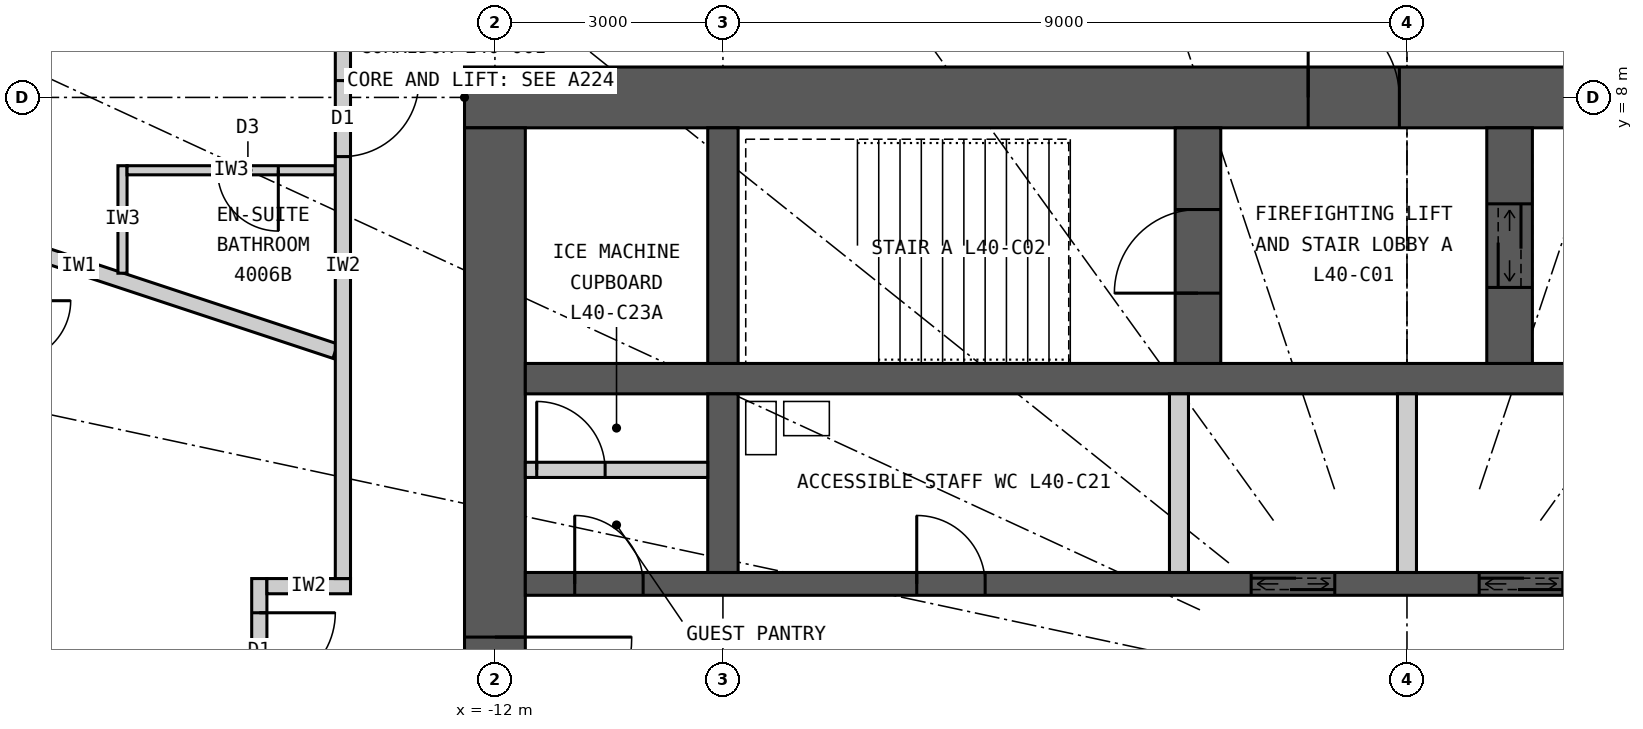
"""IFC4 building model, lengths in metres.
Left out: names, types, materials, properties, quantities, classifications, styles, units other than length and angle.
Written with IfcOpenShell. Run it as: python <this file> out.ifc"""

import sys

from ifc_helpers import new_model, si_unit, direction, frame, frame_2d, origin, place, context, subcontext, project, spatial, rectangle, extrude, element, fill, save


model = new_model("IFC4")
c1 = context("Model", 3, precision=1e-05, world=origin(), true_north=direction((0.0, 1.0)))
c2 = subcontext(c1, "Body", "Model", "MODEL_VIEW")
j1 = project(units=[si_unit("LENGTHUNIT", "METRE"), si_unit("PLANEANGLEUNIT", "RADIAN")], contexts=[c1])
p1 = place(None, origin())
s1 = spatial("IfcSite", under=j1, at=p1, CompositionType="ELEMENT")
p2 = place(p1, origin())
s2 = spatial("IfcBuilding", under=s1, at=p2, CompositionType="ELEMENT")
p3 = place(p2, frame((0.0, 0.0, 153.3)))
s3 = spatial("IfcBuildingStorey", under=s2, at=p3, CompositionType="ELEMENT", Elevation=153.3)
p4 = place(p3, frame((-12.4, 8.0, 0.0), z_axis=(0.0, 0.0, 1.0), x_axis=(1.0, 0.0, 0.0)))
e1 = element("IfcWall", 1, at=p4, inside=s3, PredefinedType="SHEAR", context=c2, shape_type="SweptSolid", body=[
    extrude(rectangle(XDim=24.8, YDim=0.8, at=frame_2d((12.4, 0.0))), origin(), (0.0, 0.0, 1.0), 3.3),
])
p5 = place(p4, frame((11.1, 0.0, 0.0)))
e2 = element("IfcOpeningElement", 2, at=p5, cuts=e1, PredefinedType="OPENING", context=c2, shape_type="SweptSolid", body=[
    extrude(rectangle(XDim=1.2, YDim=2.2, at=frame_2d((0.6, 1.1))), frame((0.0, 0.41, 0.0), z_axis=(0.0, -1.0, 0.0), x_axis=(1.0, 0.0, 0.0)), (0.0, 0.0, 1.0), 0.82),
])
p6 = place(p4, frame((18.7, 0.0, 0.0)))
e3 = element("IfcOpeningElement", 3, at=p6, cuts=e1, PredefinedType="OPENING", context=c2, shape_type="SweptSolid", body=[
    extrude(rectangle(XDim=0.9, YDim=2.2, at=frame_2d((0.45, 1.1))), frame((0.0, 0.41, 0.0), z_axis=(0.0, -1.0, 0.0), x_axis=(1.0, 0.0, 0.0)), (0.0, 0.0, 1.0), 0.82),
])
p7 = place(p3, frame((-12.0, 7.6, 0.0), z_axis=(0.0, 0.0, 1.0), x_axis=(0.0, -1.0, 0.0)))
e4 = element("IfcWall", 4, at=p7, inside=s3, PredefinedType="SHEAR", context=c2, shape_type="SweptSolid", body=[
    extrude(rectangle(XDim=15.2, YDim=0.8, at=frame_2d((7.6, 0.0))), origin(), (0.0, 0.0, 1.0), 3.3),
])
p8 = place(p7, frame((6.7, 0.0, 0.0)))
e5 = element("IfcOpeningElement", 5, at=p8, cuts=e4, PredefinedType="OPENING", context=c2, shape_type="SweptSolid", body=[
    extrude(rectangle(XDim=1.8, YDim=2.2, at=frame_2d((0.9, 1.1))), frame((0.0, 0.41, 0.0), z_axis=(0.0, -1.0, 0.0), x_axis=(1.0, 0.0, 0.0)), (0.0, 0.0, 1.0), 0.82),
])
p9 = place(p3, frame((-11.6, 4.3, 0.0), z_axis=(0.0, 0.0, 1.0), x_axis=(1.0, 0.0, 0.0)))
e6 = element("IfcWall", 6, at=p9, inside=s3, PredefinedType="SHEAR", context=c2, shape_type="SweptSolid", body=[
    extrude(rectangle(XDim=23.2, YDim=0.4, at=frame_2d((11.6, 0.0))), origin(), (0.0, 0.0, 1.0), 3.3),
])
p10 = place(p3, frame((-11.6, 1.6, 0.0), z_axis=(0.0, 0.0, 1.0), x_axis=(1.0, 0.0, 0.0)))
e7 = element("IfcWall", 7, at=p10, inside=s3, PredefinedType="SHEAR", context=c2, shape_type="SweptSolid", body=[
    extrude(rectangle(XDim=23.2, YDim=0.3, at=frame_2d((11.6, 0.0))), origin(), (0.0, 0.0, 1.0), 3.3),
])
p11 = place(p10, frame((9.55, 0.0, 0.0)))
e8 = element("IfcOpeningElement", 8, at=p11, cuts=e7, PredefinedType="OPENING", context=c2, shape_type="SweptSolid", body=[
    extrude(rectangle(XDim=1.1, YDim=2.2, at=frame_2d((0.55, 1.1))), frame((0.0, 0.16, 0.0), z_axis=(0.0, -1.0, 0.0), x_axis=(1.0, 0.0, 0.0)), (0.0, 0.0, 1.0), 0.32),
])
p12 = place(p10, frame((12.55, 0.0, 0.0)))
e9 = element("IfcOpeningElement", 9, at=p12, cuts=e7, PredefinedType="OPENING", context=c2, shape_type="SweptSolid", body=[
    extrude(rectangle(XDim=1.1, YDim=2.2, at=frame_2d((0.55, 1.1))), frame((0.0, 0.16, 0.0), z_axis=(0.0, -1.0, 0.0), x_axis=(1.0, 0.0, 0.0)), (0.0, 0.0, 1.0), 0.32),
])
p13 = place(p10, frame((5.15, 0.0, 0.0)))
e10 = element("IfcOpeningElement", 10, at=p13, cuts=e7, PredefinedType="OPENING", context=c2, shape_type="SweptSolid", body=[
    extrude(rectangle(XDim=0.9, YDim=2.2, at=frame_2d((0.45, 1.1))), frame((0.0, 0.16, 0.0), z_axis=(0.0, -1.0, 0.0), x_axis=(1.0, 0.0, 0.0)), (0.0, 0.0, 1.0), 0.32),
])
p14 = place(p10, frame((21.65, 0.0, 0.0)))
e11 = element("IfcOpeningElement", 11, at=p14, cuts=e7, PredefinedType="OPENING", context=c2, shape_type="SweptSolid", body=[
    extrude(rectangle(XDim=0.9, YDim=2.2, at=frame_2d((0.45, 1.1))), frame((0.0, 0.16, 0.0), z_axis=(0.0, -1.0, 0.0), x_axis=(1.0, 0.0, 0.0)), (0.0, 0.0, 1.0), 0.32),
])
p15 = place(p10, frame((0.65, 0.0, 0.0)))
e12 = element("IfcOpeningElement", 12, at=p15, cuts=e7, PredefinedType="OPENING", context=c2, shape_type="SweptSolid", body=[
    extrude(rectangle(XDim=0.9, YDim=2.2, at=frame_2d((0.45, 1.1))), frame((0.0, 0.16, 0.0), z_axis=(0.0, -1.0, 0.0), x_axis=(1.0, 0.0, 0.0)), (0.0, 0.0, 1.0), 0.32),
])
p16 = place(p3, frame((-9.0, 4.5, 0.0), z_axis=(0.0, 0.0, 1.0), x_axis=(0.0, 1.0, 0.0)))
e13 = element("IfcWall", 13, at=p16, inside=s3, PredefinedType="SHEAR", context=c2, shape_type="SweptSolid", body=[
    extrude(rectangle(XDim=3.1, YDim=0.4, at=frame_2d((1.55, 0.0))), origin(), (0.0, 0.0, 1.0), 3.3),
])
p17 = place(p3, frame((-9.0, 1.75, 0.0), z_axis=(0.0, 0.0, 1.0), x_axis=(0.0, 1.0, 0.0)))
e14 = element("IfcWall", 14, at=p17, inside=s3, PredefinedType="SHEAR", context=c2, shape_type="SweptSolid", body=[
    extrude(rectangle(XDim=2.35, YDim=0.4, at=frame_2d((1.175, 0.0))), origin(), (0.0, 0.0, 1.0), 3.3),
])
p18 = place(p3, frame((-2.75, 4.5, 0.0), z_axis=(0.0, 0.0, 1.0), x_axis=(0.0, 1.0, 0.0)))
e15 = element("IfcWall", 15, at=p18, inside=s3, PredefinedType="SHEAR", context=c2, shape_type="SweptSolid", body=[
    extrude(rectangle(XDim=3.1, YDim=0.6, at=frame_2d((1.55, 0.0))), origin(), (0.0, 0.0, 1.0), 3.3),
])
p19 = place(p18, frame((0.925, 0.0, 0.0)))
e16 = element("IfcOpeningElement", 16, at=p19, cuts=e15, PredefinedType="OPENING", context=c2, shape_type="SweptSolid", body=[
    extrude(rectangle(XDim=1.1, YDim=2.2, at=frame_2d((0.55, 1.1))), frame((0.0, 0.31, 0.0), z_axis=(0.0, -1.0, 0.0), x_axis=(1.0, 0.0, 0.0)), (0.0, 0.0, 1.0), 0.62),
])
p20 = place(p3, frame((1.35, 4.5, 0.0), z_axis=(0.0, 0.0, 1.0), x_axis=(0.0, 1.0, 0.0)))
e17 = element("IfcWall", 17, at=p20, inside=s3, PredefinedType="SHEAR", context=c2, shape_type="SweptSolid", body=[
    extrude(rectangle(XDim=3.1, YDim=0.6, at=frame_2d((1.55, 0.0))), origin(), (0.0, 0.0, 1.0), 3.3),
])
p21 = place(p20, frame((1.0, 0.0, 0.0)))
e18 = element("IfcOpeningElement", 18, at=p21, cuts=e17, PredefinedType="OPENING", context=c2, shape_type="SweptSolid", body=[
    extrude(rectangle(XDim=1.1, YDim=2.2, at=frame_2d((0.55, 1.1))), frame((0.0, 0.31, 0.0), z_axis=(0.0, -1.0, 0.0), x_axis=(1.0, 0.0, 0.0)), (0.0, 0.0, 1.0), 0.62),
])
for number, where, z_axis, x_axis in (
    (19, (-3.0, 1.75, 0.0), (0.0, 0.0, 1.0), (0.0, 1.0, 0.0)),
    (20, (0.0, 1.75, 0.0), (0.0, 0.0, 1.0), (0.0, 1.0, 0.0)),
):
    element("IfcWall", number, at=place(p3, frame(where, z_axis=z_axis, x_axis=x_axis)), inside=s3, PredefinedType="PARTITIONING", context=c2, shape_type="SweptSolid", body=[
        extrude(rectangle(XDim=2.35, YDim=0.25, at=frame_2d((1.175, 0.0))), origin(), (0.0, 0.0, 1.0), 3.3),
    ])
p22 = place(p3, frame((-14.1, 4.661, 0.0), z_axis=(0.0, 0.0, 1.0), x_axis=(-0.949453216399, 0.313908569285, 0.0)))
e21 = element("IfcWall", 21, at=p22, inside=s3, PredefinedType="PARTITIONING", context=c2, shape_type="SweptSolid", body=[
    extrude(rectangle(XDim=7.109, YDim=0.2, at=frame_2d((3.554, 0.0))), origin(), (0.0, 0.0, 1.0), 3.12),
])
p23 = place(p3, frame((-15.1, 1.67, 0.0), z_axis=(0.0, 0.0, 1.0), x_axis=(0.0, -1.0, 0.0)))
e22 = element("IfcWall", 22, at=p23, inside=s3, PredefinedType="PARTITIONING", context=c2, shape_type="SweptSolid", body=[
    extrude(rectangle(XDim=3.34, YDim=0.2, at=frame_2d((1.67, 0.0))), origin(), (0.0, 0.0, 1.0), 3.12),
])
p24 = place(p23, frame((0.45, 0.0, 0.0)))
e23 = element("IfcOpeningElement", 23, at=p24, cuts=e22, PredefinedType="OPENING", context=c2, shape_type="SweptSolid", body=[
    extrude(rectangle(XDim=1.0, YDim=2.2, at=frame_2d((0.5, 1.1))), frame((0.0, 0.11, 0.0), z_axis=(0.0, -1.0, 0.0), x_axis=(1.0, 0.0, 0.0)), (0.0, 0.0, 1.0), 0.22),
])
p25 = place(p23, frame((1.89, 0.0, 0.0)))
e24 = element("IfcOpeningElement", 24, at=p25, cuts=e22, PredefinedType="OPENING", context=c2, shape_type="SweptSolid", body=[
    extrude(rectangle(XDim=1.0, YDim=2.2, at=frame_2d((0.5, 1.1))), frame((0.0, 0.11, 0.0), z_axis=(0.0, -1.0, 0.0), x_axis=(1.0, 0.0, 0.0)), (0.0, 0.0, 1.0), 0.22),
])
p26 = place(p3, frame((-13.9, 1.57, 0.0), z_axis=(0.0, 0.0, 1.0), x_axis=(-1.0, 0.0, 0.0)))
e25 = element("IfcWall", 25, at=p26, inside=s3, PredefinedType="PARTITIONING", context=c2, shape_type="SweptSolid", body=[
    extrude(rectangle(XDim=1.1, YDim=0.2, at=frame_2d((0.55, 0.0))), origin(), (0.0, 0.0, 1.0), 2.47),
])
p27 = place(p3, frame((-16.9, 5.687, 0.0), z_axis=(0.0, 0.0, 1.0), x_axis=(0.0, 1.0, 0.0)))
e26 = element("IfcWall", 26, at=p27, inside=s3, PredefinedType="PARTITIONING", context=c2, shape_type="SweptSolid", body=[
    extrude(rectangle(XDim=1.414, YDim=0.12, at=frame_2d((0.707, 0.0))), origin(), (0.0, 0.0, 1.0), 3.12),
])
p28 = place(p3, frame((-14.1, 7.042, 0.0), z_axis=(0.0, 0.0, 1.0), x_axis=(-1.0, 0.0, 0.0)))
e27 = element("IfcWall", 27, at=p28, inside=s3, PredefinedType="PARTITIONING", context=c2, shape_type="SweptSolid", body=[
    extrude(rectangle(XDim=2.74, YDim=0.12, at=frame_2d((1.37, 0.0))), origin(), (0.0, 0.0, 1.0), 3.12),
])
p29 = place(p28, frame((0.75, 0.0, 0.0)))
e28 = element("IfcOpeningElement", 28, at=p29, cuts=e27, PredefinedType="OPENING", context=c2, shape_type="SweptSolid", body=[
    extrude(rectangle(XDim=0.8, YDim=2.1, at=frame_2d((0.4, 1.05))), frame((0.0, 0.07, 0.0), z_axis=(0.0, -1.0, 0.0), x_axis=(1.0, 0.0, 0.0)), (0.0, 0.0, 1.0), 0.14),
])
p30 = place(p3, frame((-14.0, 9.9, 0.0), z_axis=(0.0, 0.0, 1.0), x_axis=(0.0, -1.0, 0.0)))
e29 = element("IfcWall", 29, at=p30, inside=s3, PredefinedType="PARTITIONING", context=c2, shape_type="SweptSolid", body=[
    extrude(rectangle(XDim=8.23, YDim=0.2, at=frame_2d((4.115, 0.0))), origin(), (0.0, 0.0, 1.0), 3.12),
])
p31 = place(p30, frame((1.678, 0.0, 0.0)))
e30 = element("IfcOpeningElement", 30, at=p31, cuts=e29, PredefinedType="OPENING", context=c2, shape_type="SweptSolid", body=[
    extrude(rectangle(XDim=1.0, YDim=2.2, at=frame_2d((0.5, 1.1))), frame((0.0, 0.11, 0.0), z_axis=(0.0, -1.0, 0.0), x_axis=(1.0, 0.0, 0.0)), (0.0, 0.0, 1.0), 0.22),
])
p32 = place(p3, frame((-11.6, 3.1, 0.0), z_axis=(0.0, 0.0, 1.0), x_axis=(1.0, 0.0, 0.0)))
e31 = element("IfcWall", 31, at=p32, inside=s3, PredefinedType="PARTITIONING", context=c2, shape_type="SweptSolid", body=[
    extrude(rectangle(XDim=2.4, YDim=0.2, at=frame_2d((1.2, 0.0))), origin(), (0.0, 0.0, 1.0), 3.12),
])
p33 = place(p32, frame((0.15, 0.0, 0.0)))
e32 = element("IfcOpeningElement", 32, at=p33, cuts=e31, PredefinedType="OPENING", context=c2, shape_type="SweptSolid", body=[
    extrude(rectangle(XDim=0.9, YDim=2.2, at=frame_2d((0.45, 1.1))), frame((0.0, 0.11, 0.0), z_axis=(0.0, -1.0, 0.0), x_axis=(1.0, 0.0, 0.0)), (0.0, 0.0, 1.0), 0.22),
])
p34 = place(p29, origin())
e33 = element("IfcDoor", 33, at=p34, inside=s3, OperationType="SINGLE_SWING_LEFT", PredefinedType="DOOR", context=c2, shape_type="SweptSolid", body=[
    extrude(rectangle(XDim=0.8, YDim=2.1, at=frame_2d((0.4, 1.05))), frame((0.0, 0.025, 0.0), z_axis=(0.0, -1.0, 0.0), x_axis=(1.0, 0.0, 0.0)), (0.0, 0.0, 1.0), 0.05),
])
fill(e28, e33)
p35 = place(p31, origin())
e34 = element("IfcDoor", 34, at=p35, inside=s3, OperationType="SINGLE_SWING_LEFT", PredefinedType="DOOR", context=c2, shape_type="SweptSolid", body=[
    extrude(rectangle(XDim=1.0, YDim=2.2, at=frame_2d((0.5, 1.1))), frame((0.0, 0.025, 0.0), z_axis=(0.0, -1.0, 0.0), x_axis=(1.0, 0.0, 0.0)), (0.0, 0.0, 1.0), 0.05),
])
fill(e30, e34)
p36 = place(p24, origin())
e35 = element("IfcDoor", 35, at=p36, inside=s3, OperationType="SINGLE_SWING_LEFT", PredefinedType="DOOR", context=c2, shape_type="SweptSolid", body=[
    extrude(rectangle(XDim=1.0, YDim=2.2, at=frame_2d((0.5, 1.1))), frame((0.0, 0.025, 0.0), z_axis=(0.0, -1.0, 0.0), x_axis=(1.0, 0.0, 0.0)), (0.0, 0.0, 1.0), 0.05),
])
fill(e23, e35)
p37 = place(p5, origin())
e36 = element("IfcDoor", 36, at=p37, inside=s3, OperationType="SINGLE_SWING_LEFT", PredefinedType="DOOR", context=c2, shape_type="SweptSolid", body=[
    extrude(rectangle(XDim=1.2, YDim=2.2, at=frame_2d((0.6, 1.1))), frame((0.0, 0.025, 0.0), z_axis=(0.0, -1.0, 0.0), x_axis=(1.0, 0.0, 0.0)), (0.0, 0.0, 1.0), 0.05),
])
fill(e2, e36)
p38 = place(p19, origin())
e37 = element("IfcDoor", 37, at=p38, inside=s3, OperationType="SINGLE_SWING_LEFT", PredefinedType="DOOR", context=c2, shape_type="SweptSolid", body=[
    extrude(rectangle(XDim=1.1, YDim=2.2, at=frame_2d((0.55, 1.1))), frame((0.0, 0.025, 0.0), z_axis=(0.0, -1.0, 0.0), x_axis=(1.0, 0.0, 0.0)), (0.0, 0.0, 1.0), 0.05),
])
fill(e16, e37)
p39 = place(p21, origin())
e38 = element("IfcDoor", 38, at=p39, inside=s3, OperationType="DOUBLE_DOOR_SLIDING", PredefinedType="DOOR", context=c2, shape_type="SweptSolid", body=[
    extrude(rectangle(XDim=1.1, YDim=2.2, at=frame_2d((0.55, 1.1))), frame((0.0, 0.025, 0.0), z_axis=(0.0, -1.0, 0.0), x_axis=(1.0, 0.0, 0.0)), (0.0, 0.0, 1.0), 0.05),
])
fill(e18, e38)
p40 = place(p11, origin())
e39 = element("IfcDoor", 39, at=p40, inside=s3, OperationType="DOUBLE_DOOR_SLIDING", PredefinedType="DOOR", context=c2, shape_type="SweptSolid", body=[
    extrude(rectangle(XDim=1.1, YDim=2.2, at=frame_2d((0.55, 1.1))), frame((0.0, 0.025, 0.0), z_axis=(0.0, -1.0, 0.0), x_axis=(1.0, 0.0, 0.0)), (0.0, 0.0, 1.0), 0.05),
])
fill(e8, e39)
p41 = place(p12, origin())
e40 = element("IfcDoor", 40, at=p41, inside=s3, OperationType="DOUBLE_DOOR_SLIDING", PredefinedType="DOOR", context=c2, shape_type="SweptSolid", body=[
    extrude(rectangle(XDim=1.1, YDim=2.2, at=frame_2d((0.55, 1.1))), frame((0.0, 0.025, 0.0), z_axis=(0.0, -1.0, 0.0), x_axis=(1.0, 0.0, 0.0)), (0.0, 0.0, 1.0), 0.05),
])
fill(e9, e40)
p42 = place(p13, origin())
e41 = element("IfcDoor", 41, at=p42, inside=s3, OperationType="SINGLE_SWING_LEFT", PredefinedType="DOOR", context=c2, shape_type="SweptSolid", body=[
    extrude(rectangle(XDim=0.9, YDim=2.2, at=frame_2d((0.45, 1.1))), frame((0.0, 0.025, 0.0), z_axis=(0.0, -1.0, 0.0), x_axis=(1.0, 0.0, 0.0)), (0.0, 0.0, 1.0), 0.05),
])
fill(e10, e41)
p43 = place(p15, origin())
e42 = element("IfcDoor", 42, at=p43, inside=s3, OperationType="SINGLE_SWING_LEFT", PredefinedType="DOOR", context=c2, shape_type="SweptSolid", body=[
    extrude(rectangle(XDim=0.9, YDim=2.2, at=frame_2d((0.45, 1.1))), frame((0.0, 0.025, 0.0), z_axis=(0.0, -1.0, 0.0), x_axis=(1.0, 0.0, 0.0)), (0.0, 0.0, 1.0), 0.05),
])
fill(e12, e42)
p44 = place(p33, origin())
e43 = element("IfcDoor", 43, at=p44, inside=s3, OperationType="SINGLE_SWING_LEFT", PredefinedType="DOOR", context=c2, shape_type="SweptSolid", body=[
    extrude(rectangle(XDim=0.9, YDim=2.2, at=frame_2d((0.45, 1.1))), frame((0.0, 0.025, 0.0), z_axis=(0.0, -1.0, 0.0), x_axis=(1.0, 0.0, 0.0)), (0.0, 0.0, 1.0), 0.05),
])
fill(e32, e43)
p45 = place(p8, origin())
e44 = element("IfcDoor", 44, at=p45, inside=s3, OperationType="DOUBLE_DOOR_DOUBLE_SWING", PredefinedType="DOOR", context=c2, shape_type="SweptSolid", body=[
    extrude(rectangle(XDim=1.8, YDim=2.2, at=frame_2d((0.9, 1.1))), frame((0.0, 0.025, 0.0), z_axis=(0.0, -1.0, 0.0), x_axis=(1.0, 0.0, 0.0)), (0.0, 0.0, 1.0), 0.05),
])
fill(e5, e44)
save(model, sys.argv[1])
